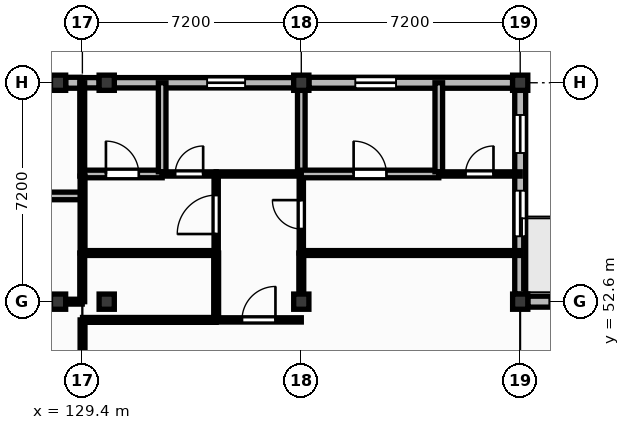
"""IFC4 building model, lengths in metres.
Left out: names, types, materials, properties, quantities, classifications, styles, units other than length and angle.
Written with IfcOpenShell. Run it as: python <this file> out.ifc"""

import sys

from ifc_helpers import new_model, si_unit, direction, frame, frame_2d, origin, origin_2d, place, context, subcontext, project, spatial, rectangle, extrude, element, fill, save


model = new_model("IFC4")
c1 = context("Model", 3, precision=1e-05, world=origin(), true_north=direction((0.0, 1.0)))
c2 = subcontext(c1, "Body", "Model", "MODEL_VIEW")
j1 = project(units=[si_unit("LENGTHUNIT", "METRE"), si_unit("PLANEANGLEUNIT", "RADIAN")], contexts=[c1])
p1 = place(None, origin())
s1 = spatial("IfcSite", under=j1, at=p1, CompositionType="ELEMENT")
p2 = place(p1, origin())
s2 = spatial("IfcBuilding", under=s1, at=p2, CompositionType="ELEMENT")
p3 = place(p2, frame((0.0, 0.0, 4.5)))
s3 = spatial("IfcBuildingStorey", under=s2, at=p3, CompositionType="ELEMENT", Elevation=4.5)
for number, where, z_axis, x_axis in (
    (1, (128.6, 52.6, 0.0), (0.0, 0.0, 1.0), (1.0, 0.0, 0.0)),
    (2, (128.6, 59.8, 0.0), (0.0, 0.0, 1.0), (1.0, 0.0, 0.0)),
    (3, (130.2, 52.6, 0.0), (0.0, 0.0, 1.0), (1.0, 0.0, 0.0)),
    (4, (130.2, 59.8, 0.0), (0.0, 0.0, 1.0), (1.0, 0.0, 0.0)),
    (5, (136.6, 52.6, 0.0), (0.0, 0.0, 1.0), (1.0, 0.0, 0.0)),
    (6, (136.6, 59.8, 0.0), (0.0, 0.0, 1.0), (1.0, 0.0, 0.0)),
    (7, (143.8, 52.6, 0.0), (0.0, 0.0, 1.0), (1.0, 0.0, 0.0)),
    (8, (143.8, 59.8, 0.0), (0.0, 0.0, 1.0), (1.0, 0.0, 0.0)),
):
    element("IfcColumn", number, at=place(p3, frame(where, z_axis=z_axis, x_axis=x_axis)), inside=s3, PredefinedType="COLUMN", context=c2, shape_type="SweptSolid", body=[
        extrude(rectangle(XDim=0.5, YDim=0.5, at=origin_2d()), origin(), (0.0, 0.0, 1.0), 4.22),
    ])
p4 = place(p3, frame((128.85, 59.8, 0.0), z_axis=(0.0, 0.0, 1.0), x_axis=(1.0, 0.0, 0.0)))
e9 = element("IfcWall", 9, at=p4, inside=s3, PredefinedType="SOLIDWALL", context=c2, shape_type="SweptSolid", body=[
    extrude(rectangle(XDim=0.485, YDim=0.36, at=frame_2d((0.242, 0.0))), origin(), (0.0, 0.0, 1.0), 4.22),
])
p5 = place(p3, frame((129.405, 59.8, 0.0), z_axis=(0.0, 0.0, 1.0), x_axis=(1.0, 0.0, 0.0)))
e10 = element("IfcWall", 10, at=p5, inside=s3, PredefinedType="SOLIDWALL", context=c2, shape_type="SweptSolid", body=[
    extrude(rectangle(XDim=0.545, YDim=0.34, at=frame_2d((0.272, 0.0))), origin(), (0.0, 0.0, 1.0), 4.22),
])
p6 = place(p3, frame((130.45, 59.8, 0.0), z_axis=(0.0, 0.0, 1.0), x_axis=(1.0, 0.0, 0.0)))
e11 = element("IfcWall", 11, at=p6, inside=s3, PredefinedType="SOLIDWALL", context=c2, shape_type="SweptSolid", body=[
    extrude(rectangle(XDim=5.9, YDim=0.34, at=frame_2d((2.95, 0.0))), origin(), (0.0, 0.0, 1.0), 3.52),
])
p7 = place(p6, frame((3.052, 0.0, 1.35)))
e12 = element("IfcOpeningElement", 12, at=p7, cuts=e11, PredefinedType="OPENING", context=c2, shape_type="SweptSolid", body=[
    extrude(rectangle(XDim=1.25, YDim=1.4, at=frame_2d((0.625, 0.7))), frame((0.0, 0.18, 0.0), z_axis=(0.0, -1.0, 0.0), x_axis=(1.0, 0.0, 0.0)), (0.0, 0.0, 1.0), 0.36),
])
p8 = place(p3, frame((136.85, 59.8, 0.0), z_axis=(0.0, 0.0, 1.0), x_axis=(1.0, 0.0, 0.0)))
e13 = element("IfcWall", 13, at=p8, inside=s3, PredefinedType="SOLIDWALL", context=c2, shape_type="SweptSolid", body=[
    extrude(rectangle(XDim=6.7, YDim=0.36, at=frame_2d((3.35, 0.0))), origin(), (0.0, 0.0, 1.0), 3.52),
])
p9 = place(p8, frame((1.526, 0.0, 1.0)))
e14 = element("IfcOpeningElement", 14, at=p9, cuts=e13, PredefinedType="OPENING", context=c2, shape_type="SweptSolid", body=[
    extrude(rectangle(XDim=1.34, YDim=1.95, at=frame_2d((0.67, 0.975))), frame((0.0, 0.19, 0.0), z_axis=(0.0, -1.0, 0.0), x_axis=(1.0, 0.0, 0.0)), (0.0, 0.0, 1.0), 0.38),
])
p10 = place(p3, frame((143.8, 52.85, 0.0), z_axis=(0.0, 0.0, 1.0), x_axis=(0.0, 1.0, 0.0)))
e15 = element("IfcWall", 15, at=p10, inside=s3, PredefinedType="SOLIDWALL", context=c2, shape_type="SweptSolid", body=[
    extrude(rectangle(XDim=6.7, YDim=0.36, at=frame_2d((3.35, 0.0))), origin(), (0.0, 0.0, 1.0), 3.52),
])
p11 = place(p10, frame((1.9, 0.0, 1.5)))
e16 = element("IfcOpeningElement", 16, at=p11, cuts=e15, PredefinedType="OPENING", context=c2, shape_type="SweptSolid", body=[
    extrude(rectangle(XDim=1.5, YDim=1.25, at=frame_2d((0.75, 0.625))), frame((0.0, 0.19, 0.0), z_axis=(0.0, -1.0, 0.0), x_axis=(1.0, 0.0, 0.0)), (0.0, 0.0, 1.0), 0.38),
])
p12 = place(p10, frame((4.64, 0.0, 1.35)))
e17 = element("IfcOpeningElement", 17, at=p12, cuts=e15, PredefinedType="OPENING", context=c2, shape_type="SweptSolid", body=[
    extrude(rectangle(XDim=1.25, YDim=1.4, at=frame_2d((0.625, 0.7))), frame((0.0, 0.19, 0.0), z_axis=(0.0, -1.0, 0.0), x_axis=(1.0, 0.0, 0.0)), (0.0, 0.0, 1.0), 0.38),
])
p13 = place(p3, frame((144.05, 52.6, 0.0), z_axis=(0.0, 0.0, 1.0), x_axis=(1.0, 0.0, 0.0)))
e18 = element("IfcWall", 18, at=p13, inside=s3, PredefinedType="SOLIDWALL", context=c2, shape_type="SweptSolid", body=[
    extrude(rectangle(XDim=6.79, YDim=0.36, at=frame_2d((3.395, 0.0))), origin(), (0.0, 0.0, 1.0), 3.76),
])
p14 = place(p13, frame((2.805, 0.0, 0.0)))
e19 = element("IfcOpeningElement", 19, at=p14, cuts=e18, PredefinedType="OPENING", context=c2, shape_type="SweptSolid", body=[
    extrude(rectangle(XDim=1.18, YDim=2.2, at=frame_2d((0.59, 1.1))), frame((0.0, 0.19, 0.0), z_axis=(0.0, -1.0, 0.0), x_axis=(1.0, 0.0, 0.0)), (0.0, 0.0, 1.0), 0.38),
])
p15 = place(p13, frame((0.708, 0.0, 1.35)))
e20 = element("IfcOpeningElement", 20, at=p15, cuts=e18, PredefinedType="OPENING", context=c2, shape_type="SweptSolid", body=[
    extrude(rectangle(XDim=1.45, YDim=1.4, at=frame_2d((0.725, 0.7))), frame((0.0, 0.19, 0.0), z_axis=(0.0, -1.0, 0.0), x_axis=(1.0, 0.0, 0.0)), (0.0, 0.0, 1.0), 0.38),
])
p16 = place(p13, frame((4.808, 0.0, 1.0)))
e21 = element("IfcOpeningElement", 21, at=p16, cuts=e18, PredefinedType="OPENING", context=c2, shape_type="SweptSolid", body=[
    extrude(rectangle(XDim=1.1, YDim=2.2, at=frame_2d((0.55, 1.1))), frame((0.0, 0.19, 0.0), z_axis=(0.0, -1.0, 0.0), x_axis=(1.0, 0.0, 0.0)), (0.0, 0.0, 1.0), 0.38),
])
p17 = place(p3, frame((124.6, 56.078, 0.0), z_axis=(0.0, 0.0, 1.0), x_axis=(1.0, 0.0, 0.0)))
e22 = element("IfcWall", 22, at=p17, inside=s3, PredefinedType="SOLIDWALL", context=c2, shape_type="SweptSolid", body=[
    extrude(rectangle(XDim=4.795, YDim=0.25, at=frame_2d((2.397, 0.0))), origin(), (0.0, 0.0, 1.0), 4.18),
])
p18 = place(p3, frame((129.405, 56.8, 0.0), z_axis=(0.0, 0.0, 1.0), x_axis=(1.0, 0.0, 0.0)))
e23 = element("IfcWall", 23, at=p18, inside=s3, PredefinedType="SOLIDWALL", context=c2, shape_type="SweptSolid", body=[
    extrude(rectangle(XDim=2.619, YDim=0.25, at=frame_2d((1.31, 0.0))), origin(), (0.0, 0.0, 1.0), 4.18),
])
p19 = place(p18, frame((0.77, 0.0, 0.0)))
e24 = element("IfcOpeningElement", 24, at=p19, cuts=e23, PredefinedType="OPENING", context=c2, shape_type="SweptSolid", body=[
    extrude(rectangle(XDim=1.08, YDim=2.15, at=frame_2d((0.54, 1.075))), frame((0.0, 0.135, 0.0), z_axis=(0.0, -1.0, 0.0), x_axis=(1.0, 0.0, 0.0)), (0.0, 0.0, 1.0), 0.27),
])
p20 = place(p3, frame((132.024, 56.87, 0.0), z_axis=(0.0, 0.0, 1.0), x_axis=(0.0, 1.0, 0.0)))
e25 = element("IfcWall", 25, at=p20, inside=s3, PredefinedType="SOLIDWALL", context=c2, shape_type="SweptSolid", body=[
    extrude(rectangle(XDim=2.93, YDim=0.25, at=frame_2d((1.465, 0.0))), origin(), (0.0, 0.0, 1.0), 4.18),
])
p21 = place(p3, frame((132.024, 56.8, 0.0), z_axis=(0.0, 0.0, 1.0), x_axis=(1.0, 0.0, 0.0)))
e26 = element("IfcWall", 26, at=p21, inside=s3, PredefinedType="PARTITIONING", context=c2, shape_type="SweptSolid", body=[
    extrude(rectangle(XDim=1.776, YDim=0.14, at=frame_2d((0.888, 0.0))), origin(), (0.0, 0.0, 1.0), 4.18),
])
p22 = place(p21, frame((0.428, 0.0, 0.0)))
e27 = element("IfcOpeningElement", 27, at=p22, cuts=e26, PredefinedType="OPENING", context=c2, shape_type="SweptSolid", body=[
    extrude(rectangle(XDim=0.92, YDim=2.1, at=frame_2d((0.46, 1.05))), frame((0.0, 0.08, 0.0), z_axis=(0.0, -1.0, 0.0), x_axis=(1.0, 0.0, 0.0)), (0.0, 0.0, 1.0), 0.16),
])
p23 = place(p3, frame((133.8, 52.0, 0.0), z_axis=(0.0, 0.0, 1.0), x_axis=(1.0, 0.0, 0.0)))
e28 = element("IfcWall", 28, at=p23, inside=s3, PredefinedType="PARTITIONING", context=c2, shape_type="SweptSolid", body=[
    extrude(rectangle(XDim=2.8, YDim=0.14, at=frame_2d((1.4, 0.0))), origin(), (0.0, 0.0, 1.0), 4.18),
])
p24 = place(p23, frame((0.85, 0.0, 0.0)))
e29 = element("IfcOpeningElement", 29, at=p24, cuts=e28, PredefinedType="OPENING", context=c2, shape_type="SweptSolid", body=[
    extrude(rectangle(XDim=1.1, YDim=2.1, at=frame_2d((0.55, 1.05))), frame((0.0, 0.08, 0.0), z_axis=(0.0, -1.0, 0.0), x_axis=(1.0, 0.0, 0.0)), (0.0, 0.0, 1.0), 0.16),
])
p25 = place(p3, frame((133.8, 54.2, 0.0), z_axis=(0.0, 0.0, 1.0), x_axis=(0.0, 1.0, 0.0)))
e30 = element("IfcWall", 30, at=p25, inside=s3, PredefinedType="PARTITIONING", context=c2, shape_type="SweptSolid", body=[
    extrude(rectangle(XDim=2.53, YDim=0.14, at=frame_2d((1.265, 0.0))), origin(), (0.0, 0.0, 1.0), 4.18),
])
p26 = place(p25, frame((0.625, 0.0, 0.0)))
e31 = element("IfcOpeningElement", 31, at=p26, cuts=e30, PredefinedType="OPENING", context=c2, shape_type="SweptSolid", body=[
    extrude(rectangle(XDim=1.28, YDim=2.2, at=frame_2d((0.64, 1.1))), frame((0.0, 0.08, 0.0), z_axis=(0.0, -1.0, 0.0), x_axis=(1.0, 0.0, 0.0)), (0.0, 0.0, 1.0), 0.16),
])
p27 = place(p3, frame((133.8, 56.8, 0.0), z_axis=(0.0, 0.0, 1.0), x_axis=(1.0, 0.0, 0.0)))
e32 = element("IfcWall", 32, at=p27, inside=s3, PredefinedType="PARTITIONING", context=c2, shape_type="SweptSolid", body=[
    extrude(rectangle(XDim=2.8, YDim=0.14, at=frame_2d((1.4, 0.0))), origin(), (0.0, 0.0, 1.0), 4.18),
])
p28 = place(p3, frame((136.6, 54.2, 0.0), z_axis=(0.0, 0.0, 1.0), x_axis=(0.0, 1.0, 0.0)))
e33 = element("IfcWall", 33, at=p28, inside=s3, PredefinedType="PARTITIONING", context=c2, shape_type="SweptSolid", body=[
    extrude(rectangle(XDim=2.53, YDim=0.14, at=frame_2d((1.265, 0.0))), origin(), (0.0, 0.0, 1.0), 3.52),
])
p29 = place(p28, frame((0.79, 0.0, 0.0)))
e34 = element("IfcOpeningElement", 34, at=p29, cuts=e33, PredefinedType="OPENING", context=c2, shape_type="SweptSolid", body=[
    extrude(rectangle(XDim=0.95, YDim=2.1, at=frame_2d((0.475, 1.05))), frame((0.0, 0.08, 0.0), z_axis=(0.0, -1.0, 0.0), x_axis=(1.0, 0.0, 0.0)), (0.0, 0.0, 1.0), 0.16),
])
p30 = place(p3, frame((136.6, 56.87, 0.0), z_axis=(0.0, 0.0, 1.0), x_axis=(0.0, 1.0, 0.0)))
e35 = element("IfcWall", 35, at=p30, inside=s3, PredefinedType="SOLIDWALL", context=c2, shape_type="SweptSolid", body=[
    extrude(rectangle(XDim=2.68, YDim=0.25, at=frame_2d((1.34, 0.0))), origin(), (0.0, 0.0, 1.0), 3.52),
])
p31 = place(p3, frame((136.6, 56.8, 0.0), z_axis=(0.0, 0.0, 1.0), x_axis=(1.0, 0.0, 0.0)))
e36 = element("IfcWall", 36, at=p31, inside=s3, PredefinedType="SOLIDWALL", context=c2, shape_type="SweptSolid", body=[
    extrude(rectangle(XDim=4.522, YDim=0.25, at=frame_2d((2.261, 0.0))), origin(), (0.0, 0.0, 1.0), 4.18),
])
p32 = place(p31, frame((1.721, 0.0, 0.0)))
e37 = element("IfcOpeningElement", 37, at=p32, cuts=e36, PredefinedType="OPENING", context=c2, shape_type="SweptSolid", body=[
    extrude(rectangle(XDim=1.08, YDim=2.15, at=frame_2d((0.54, 1.075))), frame((0.0, 0.135, 0.0), z_axis=(0.0, -1.0, 0.0), x_axis=(1.0, 0.0, 0.0)), (0.0, 0.0, 1.0), 0.27),
])
p33 = place(p3, frame((141.122, 56.87, 0.0), z_axis=(0.0, 0.0, 1.0), x_axis=(0.0, 1.0, 0.0)))
e38 = element("IfcWall", 38, at=p33, inside=s3, PredefinedType="SOLIDWALL", context=c2, shape_type="SweptSolid", body=[
    extrude(rectangle(XDim=2.93, YDim=0.25, at=frame_2d((1.465, 0.0))), origin(), (0.0, 0.0, 1.0), 4.18),
])
p34 = place(p3, frame((141.122, 56.8, 0.0), z_axis=(0.0, 0.0, 1.0), x_axis=(1.0, 0.0, 0.0)))
e39 = element("IfcWall", 39, at=p34, inside=s3, PredefinedType="PARTITIONING", context=c2, shape_type="SweptSolid", body=[
    extrude(rectangle(XDim=2.678, YDim=0.14, at=frame_2d((1.339, 0.0))), origin(), (0.0, 0.0, 1.0), 4.18),
])
p35 = place(p34, frame((0.879, 0.0, 0.0)))
e40 = element("IfcOpeningElement", 40, at=p35, cuts=e39, PredefinedType="OPENING", context=c2, shape_type="SweptSolid", body=[
    extrude(rectangle(XDim=0.92, YDim=2.1, at=frame_2d((0.46, 1.05))), frame((0.0, 0.08, 0.0), z_axis=(0.0, -1.0, 0.0), x_axis=(1.0, 0.0, 0.0)), (0.0, 0.0, 1.0), 0.16),
])
p36 = place(p3, frame((133.8, 52.0, 0.0), z_axis=(0.0, 0.0, 1.0), x_axis=(-1.0, 0.0, 0.0)))
e41 = element("IfcWall", 41, at=p36, inside=s3, PredefinedType="PARTITIONING", context=c2, shape_type="SweptSolid", body=[
    extrude(rectangle(XDim=4.395, YDim=0.16, at=frame_2d((2.198, 0.0))), origin(), (0.0, 0.0, 1.0), 4.18),
])
p37 = place(p3, frame((129.405, 50.6, 0.0), z_axis=(0.0, 0.0, 1.0), x_axis=(0.0, 1.0, 0.0)))
e42 = element("IfcWall", 42, at=p37, inside=s3, PredefinedType="PARTITIONING", context=c2, shape_type="SweptSolid", body=[
    extrude(rectangle(XDim=1.4, YDim=0.16, at=frame_2d((0.7, 0.0))), origin(), (0.0, 0.0, 1.0), 4.18),
])
p38 = place(p3, frame((136.6, 52.85, 0.0), z_axis=(0.0, 0.0, 1.0), x_axis=(0.0, 1.0, 0.0)))
e43 = element("IfcWall", 43, at=p38, inside=s3, PredefinedType="PARTITIONING", context=c2, shape_type="SweptSolid", body=[
    extrude(rectangle(XDim=1.35, YDim=0.16, at=frame_2d((0.675, 0.0))), origin(), (0.0, 0.0, 1.0), 3.52),
])
p39 = place(p3, frame((133.8, 52.07, 0.0), z_axis=(0.0, 0.0, 1.0), x_axis=(0.0, 1.0, 0.0)))
e44 = element("IfcWall", 44, at=p39, inside=s3, PredefinedType="PARTITIONING", context=c2, shape_type="SweptSolid", body=[
    extrude(rectangle(XDim=2.13, YDim=0.16, at=frame_2d((1.065, 0.0))), origin(), (0.0, 0.0, 1.0), 4.18),
])
p40 = place(p3, frame((129.405, 54.2, 0.0), z_axis=(0.0, 0.0, 1.0), x_axis=(1.0, 0.0, 0.0)))
e45 = element("IfcWall", 45, at=p40, inside=s3, PredefinedType="PARTITIONING", context=c2, shape_type="SweptSolid", body=[
    extrude(rectangle(XDim=4.395, YDim=0.16, at=frame_2d((2.198, 0.0))), origin(), (0.0, 0.0, 1.0), 4.18),
])
p41 = place(p3, frame((129.405, 54.2, 0.0), z_axis=(0.0, 0.0, 1.0), x_axis=(0.0, 1.0, 0.0)))
e46 = element("IfcWall", 46, at=p41, inside=s3, PredefinedType="PARTITIONING", context=c2, shape_type="SweptSolid", body=[
    extrude(rectangle(XDim=2.53, YDim=0.16, at=frame_2d((1.265, 0.0))), origin(), (0.0, 0.0, 1.0), 4.18),
])
p42 = place(p3, frame((136.6, 54.2, 0.0), z_axis=(0.0, 0.0, 1.0), x_axis=(1.0, 0.0, 0.0)))
e47 = element("IfcWall", 47, at=p42, inside=s3, PredefinedType="PARTITIONING", context=c2, shape_type="SweptSolid", body=[
    extrude(rectangle(XDim=7.2, YDim=0.16, at=frame_2d((3.6, 0.0))), origin(), (0.0, 0.0, 1.0), 4.18),
])
p43 = place(p3, frame((128.85, 52.6, 0.0), z_axis=(0.0, 0.0, 1.0), x_axis=(1.0, 0.0, 0.0)))
e48 = element("IfcWall", 48, at=p43, inside=s3, PredefinedType="PARTITIONING", context=c2, shape_type="SweptSolid", body=[
    extrude(rectangle(XDim=0.545, YDim=0.16, at=frame_2d((0.272, 0.0))), origin(), (0.0, 0.0, 1.0), 4.18),
])
p44 = place(p3, frame((129.395, 52.6, 0.0), z_axis=(0.0, 0.0, 1.0), x_axis=(0.0, 1.0, 0.0)))
e49 = element("IfcWall", 49, at=p44, inside=s3, PredefinedType="PARTITIONING", context=c2, shape_type="SweptSolid", body=[
    extrude(rectangle(XDim=1.6, YDim=0.16, at=frame_2d((0.8, 0.0))), origin(), (0.0, 0.0, 1.0), 4.18),
])
p45 = place(p3, frame((129.395, 56.73, 0.0), z_axis=(0.0, 0.0, 1.0), x_axis=(0.0, 1.0, 0.0)))
e50 = element("IfcWall", 50, at=p45, inside=s3, PredefinedType="PARTITIONING", context=c2, shape_type="SweptSolid", body=[
    extrude(rectangle(XDim=3.07, YDim=0.16, at=frame_2d((1.535, 0.0))), origin(), (0.0, 0.0, 1.0), 4.18),
])
p46 = place(p7, origin())
e51 = element("IfcWindow", 51, at=p46, inside=s3, PartitioningType="SINGLE_PANEL", PredefinedType="WINDOW", context=c2, shape_type="SweptSolid", body=[
    extrude(rectangle(XDim=1.25, YDim=1.4, at=frame_2d((0.625, 0.7))), frame((0.0, 0.03, 0.0), z_axis=(0.0, -1.0, 0.0), x_axis=(1.0, 0.0, 0.0)), (0.0, 0.0, 1.0), 0.06),
])
fill(e12, e51)
p47 = place(p9, origin())
e52 = element("IfcWindow", 52, at=p47, inside=s3, PartitioningType="SINGLE_PANEL", PredefinedType="WINDOW", context=c2, shape_type="SweptSolid", body=[
    extrude(rectangle(XDim=1.34, YDim=1.95, at=frame_2d((0.67, 0.975))), frame((0.0, 0.03, 0.0), z_axis=(0.0, -1.0, 0.0), x_axis=(1.0, 0.0, 0.0)), (0.0, 0.0, 1.0), 0.06),
])
fill(e14, e52)
p48 = place(p11, origin())
e53 = element("IfcWindow", 53, at=p48, inside=s3, PartitioningType="DOUBLE_PANEL_VERTICAL", PredefinedType="WINDOW", context=c2, shape_type="SweptSolid", body=[
    extrude(rectangle(XDim=1.5, YDim=1.25, at=frame_2d((0.75, 0.625))), frame((0.0, 0.03, 0.0), z_axis=(0.0, -1.0, 0.0), x_axis=(1.0, 0.0, 0.0)), (0.0, 0.0, 1.0), 0.06),
])
fill(e16, e53)
p49 = place(p12, origin())
e54 = element("IfcWindow", 54, at=p49, inside=s3, PartitioningType="SINGLE_PANEL", PredefinedType="WINDOW", context=c2, shape_type="SweptSolid", body=[
    extrude(rectangle(XDim=1.25, YDim=1.4, at=frame_2d((0.625, 0.7))), frame((0.0, 0.03, 0.0), z_axis=(0.0, -1.0, 0.0), x_axis=(1.0, 0.0, 0.0)), (0.0, 0.0, 1.0), 0.06),
])
fill(e17, e54)
p50 = place(p15, origin())
e55 = element("IfcWindow", 55, at=p50, inside=s3, PartitioningType="SINGLE_PANEL", PredefinedType="WINDOW", context=c2, shape_type="SweptSolid", body=[
    extrude(rectangle(XDim=1.45, YDim=1.4, at=frame_2d((0.725, 0.7))), frame((0.0, 0.03, 0.0), z_axis=(0.0, -1.0, 0.0), x_axis=(1.0, 0.0, 0.0)), (0.0, 0.0, 1.0), 0.06),
])
fill(e20, e55)
p51 = place(p24, origin())
e56 = element("IfcDoor", 56, at=p51, inside=s3, OperationType="SINGLE_SWING_RIGHT", PredefinedType="DOOR", context=c2, shape_type="SweptSolid", body=[
    extrude(rectangle(XDim=1.1, YDim=2.1, at=frame_2d((0.55, 1.05))), frame((0.0, 0.025, 0.0), z_axis=(0.0, -1.0, 0.0), x_axis=(1.0, 0.0, 0.0)), (0.0, 0.0, 1.0), 0.05),
])
fill(e29, e56)
p52 = place(p26, origin())
e57 = element("IfcDoor", 57, at=p52, inside=s3, OperationType="SINGLE_SWING_LEFT", PredefinedType="DOOR", context=c2, shape_type="SweptSolid", body=[
    extrude(rectangle(XDim=1.28, YDim=2.2, at=frame_2d((0.64, 1.1))), frame((0.0, 0.025, 0.0), z_axis=(0.0, -1.0, 0.0), x_axis=(1.0, 0.0, 0.0)), (0.0, 0.0, 1.0), 0.05),
])
fill(e31, e57)
p53 = place(p29, origin())
e58 = element("IfcDoor", 58, at=p53, inside=s3, OperationType="SINGLE_SWING_RIGHT", PredefinedType="DOOR", context=c2, shape_type="SweptSolid", body=[
    extrude(rectangle(XDim=0.95, YDim=2.1, at=frame_2d((0.475, 1.05))), frame((0.0, 0.025, 0.0), z_axis=(0.0, -1.0, 0.0), x_axis=(1.0, 0.0, 0.0)), (0.0, 0.0, 1.0), 0.05),
])
fill(e34, e58)
p54 = place(p19, origin())
e59 = element("IfcDoor", 59, at=p54, inside=s3, OperationType="SINGLE_SWING_LEFT", PredefinedType="DOOR", context=c2, shape_type="SweptSolid", body=[
    extrude(rectangle(XDim=1.08, YDim=2.15, at=frame_2d((0.54, 1.075))), frame((0.0, 0.025, 0.0), z_axis=(0.0, -1.0, 0.0), x_axis=(1.0, 0.0, 0.0)), (0.0, 0.0, 1.0), 0.05),
])
fill(e24, e59)
p55 = place(p22, origin())
e60 = element("IfcDoor", 60, at=p55, inside=s3, OperationType="SINGLE_SWING_RIGHT", PredefinedType="DOOR", context=c2, shape_type="SweptSolid", body=[
    extrude(rectangle(XDim=0.92, YDim=2.1, at=frame_2d((0.46, 1.05))), frame((0.0, 0.025, 0.0), z_axis=(0.0, -1.0, 0.0), x_axis=(1.0, 0.0, 0.0)), (0.0, 0.0, 1.0), 0.05),
])
fill(e27, e60)
p56 = place(p32, origin())
e61 = element("IfcDoor", 61, at=p56, inside=s3, OperationType="SINGLE_SWING_LEFT", PredefinedType="DOOR", context=c2, shape_type="SweptSolid", body=[
    extrude(rectangle(XDim=1.08, YDim=2.15, at=frame_2d((0.54, 1.075))), frame((0.0, 0.025, 0.0), z_axis=(0.0, -1.0, 0.0), x_axis=(1.0, 0.0, 0.0)), (0.0, 0.0, 1.0), 0.05),
])
fill(e37, e61)
p57 = place(p35, origin())
e62 = element("IfcDoor", 62, at=p57, inside=s3, OperationType="SINGLE_SWING_RIGHT", PredefinedType="DOOR", context=c2, shape_type="SweptSolid", body=[
    extrude(rectangle(XDim=0.92, YDim=2.1, at=frame_2d((0.46, 1.05))), frame((0.0, 0.025, 0.0), z_axis=(0.0, -1.0, 0.0), x_axis=(1.0, 0.0, 0.0)), (0.0, 0.0, 1.0), 0.05),
])
fill(e40, e62)
save(model, sys.argv[1])
